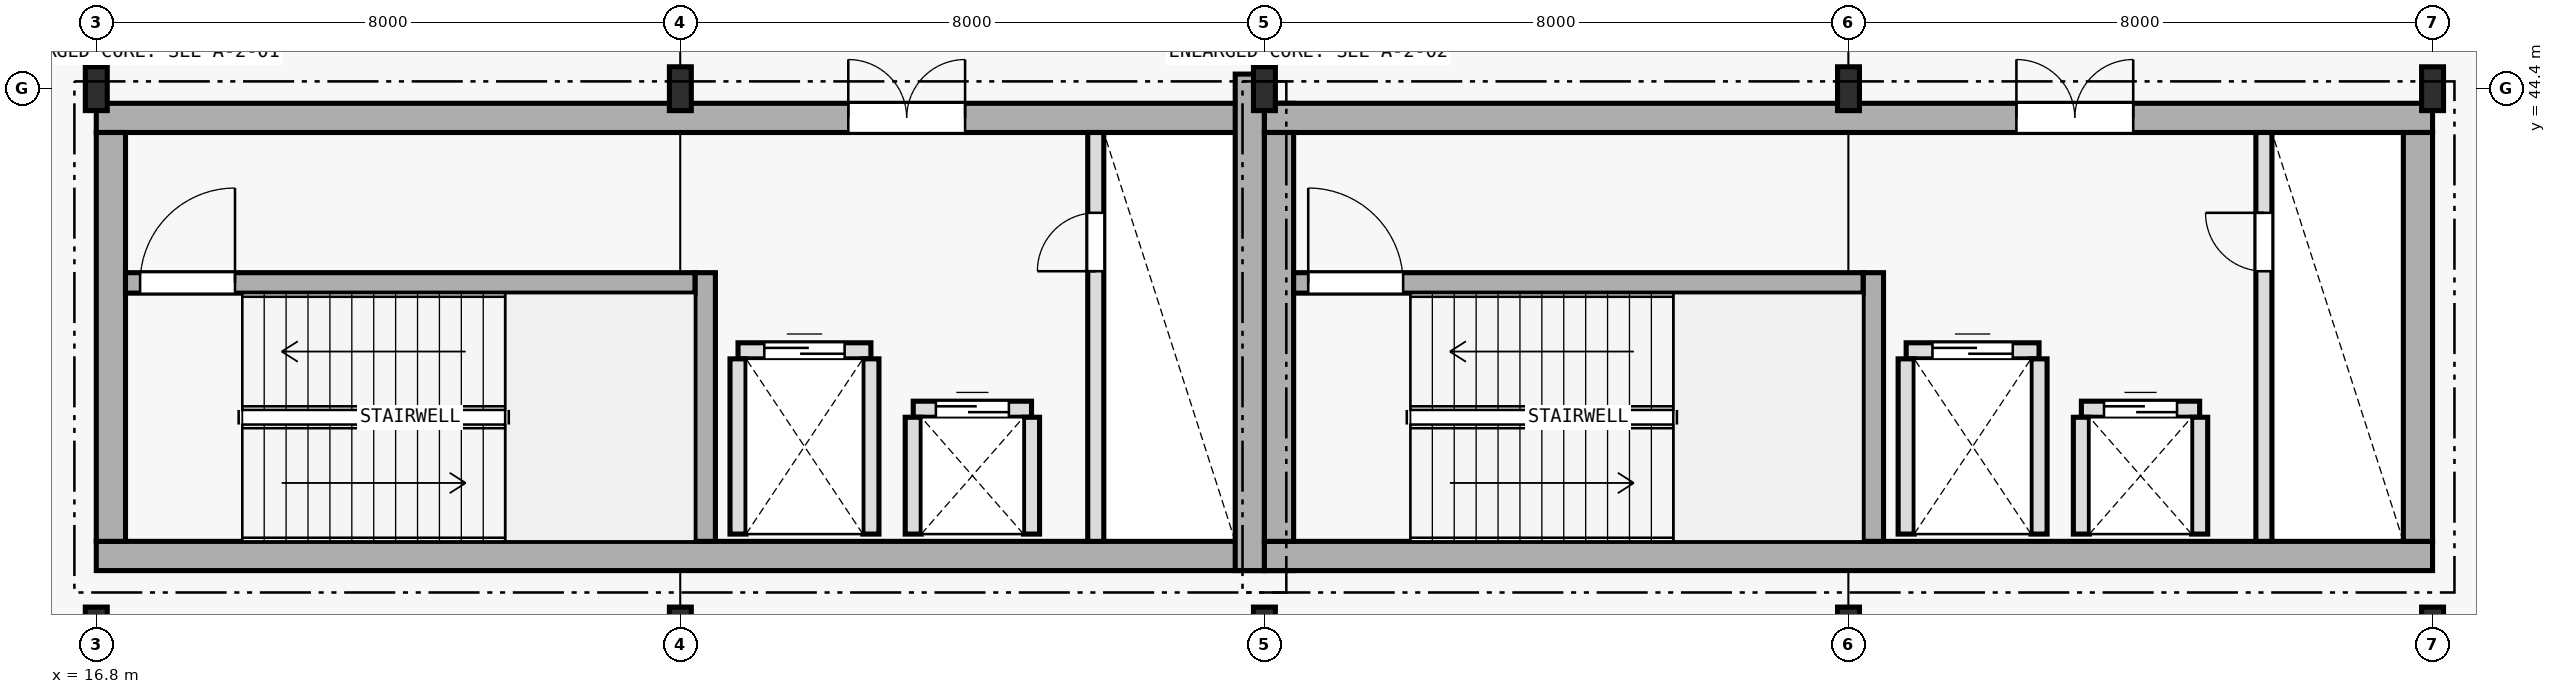
"""IFC4 building model, lengths in metres.
Left out: names, types, materials, properties, quantities, classifications, styles, units other than length and angle.
Written with IfcOpenShell. Run it as: python <this file> out.ifc"""

import sys

from ifc_helpers import new_model, si_unit, direction, frame, frame_2d, origin, origin_2d, place, context, subcontext, project, spatial, rectangle, i_section, extrude, element, fill, save


model = new_model("IFC4")
c1 = context("Model", 3, precision=1e-05, world=origin(), true_north=direction((0.0, 1.0)))
c2 = subcontext(c1, "Body", "Model", "MODEL_VIEW")
j1 = project(units=[si_unit("LENGTHUNIT", "METRE"), si_unit("PLANEANGLEUNIT", "RADIAN")], contexts=[c1])
p1 = place(None, origin())
s1 = spatial("IfcSite", under=j1, at=p1, CompositionType="ELEMENT")
p2 = place(p1, origin())
s2 = spatial("IfcBuilding", under=s1, at=p2, CompositionType="ELEMENT")
p3 = place(p2, frame((0.0, 0.0, 5.4)))
s3 = spatial("IfcBuildingStorey", under=s2, at=p3, CompositionType="ELEMENT", Elevation=5.4)
p4 = place(p3, frame((16.8, 38.0, 0.0), z_axis=(0.0, 0.0, 1.0), x_axis=(1.0, 0.0, 0.0)))
e1 = element("IfcWall", 1, at=p4, inside=s3, PredefinedType="SHEAR", context=c2, shape_type="SweptSolid", body=[
    extrude(rectangle(XDim=16.4, YDim=0.4, at=frame_2d((8.2, 0.0))), origin(), (0.0, 0.0, 1.0), 4.495),
])
p5 = place(p3, frame((16.8, 44.0, 0.0), z_axis=(0.0, 0.0, 1.0), x_axis=(1.0, 0.0, 0.0)))
e2 = element("IfcWall", 2, at=p5, inside=s3, PredefinedType="SHEAR", context=c2, shape_type="SweptSolid", body=[
    extrude(rectangle(XDim=16.4, YDim=0.4, at=frame_2d((8.2, 0.0))), origin(), (0.0, 0.0, 1.0), 4.495),
])
p6 = place(p5, frame((10.3, 0.0, 0.0)))
e3 = element("IfcOpeningElement", 3, at=p6, cuts=e2, PredefinedType="OPENING", context=c2, shape_type="SweptSolid", body=[
    extrude(rectangle(XDim=1.6, YDim=2.2, at=frame_2d((0.8, 1.1))), frame((0.0, 0.21, 0.0), z_axis=(0.0, -1.0, 0.0), x_axis=(1.0, 0.0, 0.0)), (0.0, 0.0, 1.0), 0.42),
])
p7 = place(p3, frame((17.0, 38.2, 0.0), z_axis=(0.0, 0.0, 1.0), x_axis=(0.0, 1.0, 0.0)))
e4 = element("IfcWall", 4, at=p7, inside=s3, PredefinedType="SHEAR", context=c2, shape_type="SweptSolid", body=[
    extrude(rectangle(XDim=5.6, YDim=0.4, at=frame_2d((2.8, 0.0))), origin(), (0.0, 0.0, 1.0), 4.495),
])
p8 = place(p3, frame((32.6, 37.8, 0.0), z_axis=(0.0, 0.0, 1.0), x_axis=(0.0, 1.0, 0.0)))
e5 = element("IfcWall", 5, at=p8, inside=s3, PredefinedType="SHEAR", context=c2, shape_type="SweptSolid", body=[
    extrude(rectangle(XDim=6.8, YDim=0.4, at=frame_2d((3.4, 0.0))), origin(), (0.0, 0.0, 1.0), 4.495),
])
p9 = place(p3, frame((25.14, 38.2, 0.0), z_axis=(0.0, 0.0, 1.0), x_axis=(0.0, 1.0, 0.0)))
e6 = element("IfcWall", 6, at=p9, inside=s3, PredefinedType="SHEAR", context=c2, shape_type="SweptSolid", body=[
    extrude(rectangle(XDim=3.68, YDim=0.28, at=frame_2d((1.84, 0.0))), origin(), (0.0, 0.0, 1.0), 4.495),
])
p10 = place(p3, frame((17.2, 41.74, 0.0), z_axis=(0.0, 0.0, 1.0), x_axis=(1.0, 0.0, 0.0)))
e7 = element("IfcWall", 7, at=p10, inside=s3, PredefinedType="SHEAR", context=c2, shape_type="SweptSolid", body=[
    extrude(rectangle(XDim=7.8, YDim=0.28, at=frame_2d((3.9, 0.0))), origin(), (0.0, 0.0, 1.0), 4.495),
])
p11 = place(p10, frame((0.2, 0.0, 0.0)))
e8 = element("IfcOpeningElement", 8, at=p11, cuts=e7, PredefinedType="OPENING", context=c2, shape_type="SweptSolid", body=[
    extrude(rectangle(XDim=1.3, YDim=2.2, at=frame_2d((0.65, 1.1))), frame((0.0, 0.15, 0.0), z_axis=(0.0, -1.0, 0.0), x_axis=(1.0, 0.0, 0.0)), (0.0, 0.0, 1.0), 0.3),
])
p12 = place(p3, frame((32.8, 38.0, 0.0), z_axis=(0.0, 0.0, 1.0), x_axis=(1.0, 0.0, 0.0)))
e9 = element("IfcWall", 9, at=p12, inside=s3, PredefinedType="SHEAR", context=c2, shape_type="SweptSolid", body=[
    extrude(rectangle(XDim=16.0, YDim=0.4, at=frame_2d((8.0, 0.0))), origin(), (0.0, 0.0, 1.0), 4.495),
])
p13 = place(p3, frame((32.8, 44.0, 0.0), z_axis=(0.0, 0.0, 1.0), x_axis=(1.0, 0.0, 0.0)))
e10 = element("IfcWall", 10, at=p13, inside=s3, PredefinedType="SHEAR", context=c2, shape_type="SweptSolid", body=[
    extrude(rectangle(XDim=16.0, YDim=0.4, at=frame_2d((8.0, 0.0))), origin(), (0.0, 0.0, 1.0), 4.495),
])
p14 = place(p13, frame((10.3, 0.0, 0.0)))
e11 = element("IfcOpeningElement", 11, at=p14, cuts=e10, PredefinedType="OPENING", context=c2, shape_type="SweptSolid", body=[
    extrude(rectangle(XDim=1.6, YDim=2.2, at=frame_2d((0.8, 1.1))), frame((0.0, 0.21, 0.0), z_axis=(0.0, -1.0, 0.0), x_axis=(1.0, 0.0, 0.0)), (0.0, 0.0, 1.0), 0.42),
])
for number, where, z_axis, x_axis in (
    (12, (33.0, 38.2, 0.0), (0.0, 0.0, 1.0), (0.0, 1.0, 0.0)),
    (13, (48.6, 38.2, 0.0), (0.0, 0.0, 1.0), (0.0, 1.0, 0.0)),
):
    element("IfcWall", number, at=place(p3, frame(where, z_axis=z_axis, x_axis=x_axis)), inside=s3, PredefinedType="SHEAR", context=c2, shape_type="SweptSolid", body=[
        extrude(rectangle(XDim=5.6, YDim=0.4, at=frame_2d((2.8, 0.0))), origin(), (0.0, 0.0, 1.0), 4.495),
    ])
p15 = place(p3, frame((41.14, 38.2, 0.0), z_axis=(0.0, 0.0, 1.0), x_axis=(0.0, 1.0, 0.0)))
e14 = element("IfcWall", 14, at=p15, inside=s3, PredefinedType="SHEAR", context=c2, shape_type="SweptSolid", body=[
    extrude(rectangle(XDim=3.68, YDim=0.28, at=frame_2d((1.84, 0.0))), origin(), (0.0, 0.0, 1.0), 4.495),
])
p16 = place(p3, frame((33.2, 41.74, 0.0), z_axis=(0.0, 0.0, 1.0), x_axis=(1.0, 0.0, 0.0)))
e15 = element("IfcWall", 15, at=p16, inside=s3, PredefinedType="SHEAR", context=c2, shape_type="SweptSolid", body=[
    extrude(rectangle(XDim=7.8, YDim=0.28, at=frame_2d((3.9, 0.0))), origin(), (0.0, 0.0, 1.0), 4.495),
])
p17 = place(p16, frame((0.2, 0.0, 0.0)))
e16 = element("IfcOpeningElement", 16, at=p17, cuts=e15, PredefinedType="OPENING", context=c2, shape_type="SweptSolid", body=[
    extrude(rectangle(XDim=1.3, YDim=2.2, at=frame_2d((0.65, 1.1))), frame((0.0, 0.15, 0.0), z_axis=(0.0, -1.0, 0.0), x_axis=(1.0, 0.0, 0.0)), (0.0, 0.0, 1.0), 0.3),
])
for number, where, z_axis, x_axis in (
    (17, (16.8, 37.0, 0.0), (0.0, 0.0, 1.0), (1.0, 0.0, 0.0)),
    (18, (16.8, 44.4, 0.0), (0.0, 0.0, 1.0), (1.0, 0.0, 0.0)),
    (19, (24.8, 37.0, 0.0), (0.0, 0.0, 1.0), (1.0, 0.0, 0.0)),
    (20, (24.8, 44.4, 0.0), (0.0, 0.0, 1.0), (1.0, 0.0, 0.0)),
    (21, (32.8, 37.0, 0.0), (0.0, 0.0, 1.0), (1.0, 0.0, 0.0)),
    (22, (32.8, 44.4, 0.0), (0.0, 0.0, 1.0), (1.0, 0.0, 0.0)),
    (23, (40.8, 37.0, 0.0), (0.0, 0.0, 1.0), (1.0, 0.0, 0.0)),
    (24, (40.8, 44.4, 0.0), (0.0, 0.0, 1.0), (1.0, 0.0, 0.0)),
    (25, (48.8, 37.0, 0.0), (0.0, 0.0, 1.0), (1.0, 0.0, 0.0)),
    (26, (48.8, 44.4, 0.0), (0.0, 0.0, 1.0), (1.0, 0.0, 0.0)),
):
    element("IfcColumn", number, at=place(p3, frame(where, z_axis=z_axis, x_axis=x_axis)), inside=s3, PredefinedType="COLUMN", context=c2, shape_type="SweptSolid", body=[
        extrude(i_section(OverallWidth=0.3, OverallDepth=0.6, WebThickness=0.015, FlangeThickness=0.03, FilletRadius=0.027, at=origin_2d()), origin(), (0.0, 0.0, 1.0), 4.5),
    ])
p18 = place(p3, frame((25.59, 40.81, 0.0), z_axis=(0.0, 0.0, 1.0), x_axis=(1.0, 0.0, 0.0)))
e27 = element("IfcWall", 27, at=p18, inside=s3, PredefinedType="PLUMBINGWALL", context=c2, shape_type="SweptSolid", body=[
    extrude(rectangle(XDim=1.82, YDim=0.22, at=frame_2d((0.91, 0.0))), origin(), (0.0, 0.0, 1.0), 4.2),
])
p19 = place(p18, frame((0.36, 0.0, 0.0)))
e28 = element("IfcOpeningElement", 28, at=p19, cuts=e27, PredefinedType="OPENING", context=c2, shape_type="SweptSolid", body=[
    extrude(rectangle(XDim=1.1, YDim=2.2, at=frame_2d((0.55, 1.1))), frame((0.0, 0.12, 0.0), z_axis=(0.0, -1.0, 0.0), x_axis=(1.0, 0.0, 0.0)), (0.0, 0.0, 1.0), 0.24),
])
for number, where, z_axis, x_axis in (
    (29, (25.59, 38.3, 0.0), (0.0, 0.0, 1.0), (0.0, 1.0, 0.0)),
    (30, (27.41, 38.3, 0.0), (0.0, 0.0, 1.0), (0.0, 1.0, 0.0)),
):
    element("IfcWall", number, at=place(p3, frame(where, z_axis=z_axis, x_axis=x_axis)), inside=s3, PredefinedType="PLUMBINGWALL", context=c2, shape_type="SweptSolid", body=[
        extrude(rectangle(XDim=2.4, YDim=0.22, at=frame_2d((1.2, 0.0))), origin(), (0.0, 0.0, 1.0), 4.2),
    ])
p20 = place(p3, frame((27.99, 40.01, 0.0), z_axis=(0.0, 0.0, 1.0), x_axis=(1.0, 0.0, 0.0)))
e31 = element("IfcWall", 31, at=p20, inside=s3, PredefinedType="PLUMBINGWALL", context=c2, shape_type="SweptSolid", body=[
    extrude(rectangle(XDim=1.62, YDim=0.22, at=frame_2d((0.81, 0.0))), origin(), (0.0, 0.0, 1.0), 4.2),
])
p21 = place(p20, frame((0.31, 0.0, 0.0)))
e32 = element("IfcOpeningElement", 32, at=p21, cuts=e31, PredefinedType="OPENING", context=c2, shape_type="SweptSolid", body=[
    extrude(rectangle(XDim=1.0, YDim=2.2, at=frame_2d((0.5, 1.1))), frame((0.0, 0.12, 0.0), z_axis=(0.0, -1.0, 0.0), x_axis=(1.0, 0.0, 0.0)), (0.0, 0.0, 1.0), 0.24),
])
for number, where, z_axis, x_axis in (
    (33, (27.99, 38.3, 0.0), (0.0, 0.0, 1.0), (0.0, 1.0, 0.0)),
    (34, (29.61, 38.3, 0.0), (0.0, 0.0, 1.0), (0.0, 1.0, 0.0)),
):
    element("IfcWall", number, at=place(p3, frame(where, z_axis=z_axis, x_axis=x_axis)), inside=s3, PredefinedType="PLUMBINGWALL", context=c2, shape_type="SweptSolid", body=[
        extrude(rectangle(XDim=1.6, YDim=0.22, at=frame_2d((0.8, 0.0))), origin(), (0.0, 0.0, 1.0), 4.2),
    ])
p22 = place(p3, frame((30.49, 38.2, 0.0), z_axis=(0.0, 0.0, 1.0), x_axis=(0.0, 1.0, 0.0)))
e35 = element("IfcWall", 35, at=p22, inside=s3, PredefinedType="PLUMBINGWALL", context=c2, shape_type="SweptSolid", body=[
    extrude(rectangle(XDim=5.6, YDim=0.22, at=frame_2d((2.8, 0.0))), origin(), (0.0, 0.0, 1.0), 4.2),
])
p23 = place(p22, frame((3.7, 0.0, 0.0)))
e36 = element("IfcOpeningElement", 36, at=p23, cuts=e35, PredefinedType="OPENING", context=c2, shape_type="SweptSolid", body=[
    extrude(rectangle(XDim=0.8, YDim=2.1, at=frame_2d((0.4, 1.05))), frame((0.0, 0.12, 0.0), z_axis=(0.0, -1.0, 0.0), x_axis=(1.0, 0.0, 0.0)), (0.0, 0.0, 1.0), 0.24),
])
p24 = place(p3, frame((41.59, 40.81, 0.0), z_axis=(0.0, 0.0, 1.0), x_axis=(1.0, 0.0, 0.0)))
e37 = element("IfcWall", 37, at=p24, inside=s3, PredefinedType="PLUMBINGWALL", context=c2, shape_type="SweptSolid", body=[
    extrude(rectangle(XDim=1.82, YDim=0.22, at=frame_2d((0.91, 0.0))), origin(), (0.0, 0.0, 1.0), 4.2),
])
p25 = place(p24, frame((0.36, 0.0, 0.0)))
e38 = element("IfcOpeningElement", 38, at=p25, cuts=e37, PredefinedType="OPENING", context=c2, shape_type="SweptSolid", body=[
    extrude(rectangle(XDim=1.1, YDim=2.2, at=frame_2d((0.55, 1.1))), frame((0.0, 0.12, 0.0), z_axis=(0.0, -1.0, 0.0), x_axis=(1.0, 0.0, 0.0)), (0.0, 0.0, 1.0), 0.24),
])
for number, where, z_axis, x_axis in (
    (39, (41.59, 38.3, 0.0), (0.0, 0.0, 1.0), (0.0, 1.0, 0.0)),
    (40, (43.41, 38.3, 0.0), (0.0, 0.0, 1.0), (0.0, 1.0, 0.0)),
):
    element("IfcWall", number, at=place(p3, frame(where, z_axis=z_axis, x_axis=x_axis)), inside=s3, PredefinedType="PLUMBINGWALL", context=c2, shape_type="SweptSolid", body=[
        extrude(rectangle(XDim=2.4, YDim=0.22, at=frame_2d((1.2, 0.0))), origin(), (0.0, 0.0, 1.0), 4.2),
    ])
p26 = place(p3, frame((43.99, 40.01, 0.0), z_axis=(0.0, 0.0, 1.0), x_axis=(1.0, 0.0, 0.0)))
e41 = element("IfcWall", 41, at=p26, inside=s3, PredefinedType="PLUMBINGWALL", context=c2, shape_type="SweptSolid", body=[
    extrude(rectangle(XDim=1.62, YDim=0.22, at=frame_2d((0.81, 0.0))), origin(), (0.0, 0.0, 1.0), 4.2),
])
p27 = place(p26, frame((0.31, 0.0, 0.0)))
e42 = element("IfcOpeningElement", 42, at=p27, cuts=e41, PredefinedType="OPENING", context=c2, shape_type="SweptSolid", body=[
    extrude(rectangle(XDim=1.0, YDim=2.2, at=frame_2d((0.5, 1.1))), frame((0.0, 0.12, 0.0), z_axis=(0.0, -1.0, 0.0), x_axis=(1.0, 0.0, 0.0)), (0.0, 0.0, 1.0), 0.24),
])
for number, where, z_axis, x_axis in (
    (43, (43.99, 38.3, 0.0), (0.0, 0.0, 1.0), (0.0, 1.0, 0.0)),
    (44, (45.61, 38.3, 0.0), (0.0, 0.0, 1.0), (0.0, 1.0, 0.0)),
):
    element("IfcWall", number, at=place(p3, frame(where, z_axis=z_axis, x_axis=x_axis)), inside=s3, PredefinedType="PLUMBINGWALL", context=c2, shape_type="SweptSolid", body=[
        extrude(rectangle(XDim=1.6, YDim=0.22, at=frame_2d((0.8, 0.0))), origin(), (0.0, 0.0, 1.0), 4.2),
    ])
p28 = place(p3, frame((46.49, 38.2, 0.0), z_axis=(0.0, 0.0, 1.0), x_axis=(0.0, 1.0, 0.0)))
e45 = element("IfcWall", 45, at=p28, inside=s3, PredefinedType="PLUMBINGWALL", context=c2, shape_type="SweptSolid", body=[
    extrude(rectangle(XDim=5.6, YDim=0.22, at=frame_2d((2.8, 0.0))), origin(), (0.0, 0.0, 1.0), 4.2),
])
p29 = place(p28, frame((3.7, 0.0, 0.0)))
e46 = element("IfcOpeningElement", 46, at=p29, cuts=e45, PredefinedType="OPENING", context=c2, shape_type="SweptSolid", body=[
    extrude(rectangle(XDim=0.8, YDim=2.1, at=frame_2d((0.4, 1.05))), frame((0.0, 0.12, 0.0), z_axis=(0.0, -1.0, 0.0), x_axis=(1.0, 0.0, 0.0)), (0.0, 0.0, 1.0), 0.24),
])
p30 = place(p11, origin())
e47 = element("IfcDoor", 47, at=p30, inside=s3, OperationType="SINGLE_SWING_RIGHT", PredefinedType="DOOR", context=c2, shape_type="SweptSolid", body=[
    extrude(rectangle(XDim=1.3, YDim=2.2, at=frame_2d((0.65, 1.1))), frame((0.0, 0.025, 0.0), z_axis=(0.0, -1.0, 0.0), x_axis=(1.0, 0.0, 0.0)), (0.0, 0.0, 1.0), 0.05),
])
fill(e8, e47)
p31 = place(p19, origin())
e48 = element("IfcDoor", 48, at=p31, inside=s3, OperationType="DOUBLE_DOOR_SLIDING", PredefinedType="DOOR", context=c2, shape_type="SweptSolid", body=[
    extrude(rectangle(XDim=1.1, YDim=2.2, at=frame_2d((0.55, 1.1))), frame((0.0, 0.025, 0.0), z_axis=(0.0, -1.0, 0.0), x_axis=(1.0, 0.0, 0.0)), (0.0, 0.0, 1.0), 0.05),
])
fill(e28, e48)
p32 = place(p21, origin())
e49 = element("IfcDoor", 49, at=p32, inside=s3, OperationType="DOUBLE_DOOR_SLIDING", PredefinedType="DOOR", context=c2, shape_type="SweptSolid", body=[
    extrude(rectangle(XDim=1.0, YDim=2.2, at=frame_2d((0.5, 1.1))), frame((0.0, 0.025, 0.0), z_axis=(0.0, -1.0, 0.0), x_axis=(1.0, 0.0, 0.0)), (0.0, 0.0, 1.0), 0.05),
])
fill(e32, e49)
p33 = place(p23, origin())
e50 = element("IfcDoor", 50, at=p33, inside=s3, OperationType="SINGLE_SWING_LEFT", PredefinedType="DOOR", context=c2, shape_type="SweptSolid", body=[
    extrude(rectangle(XDim=0.8, YDim=2.1, at=frame_2d((0.4, 1.05))), frame((0.0, 0.025, 0.0), z_axis=(0.0, -1.0, 0.0), x_axis=(1.0, 0.0, 0.0)), (0.0, 0.0, 1.0), 0.05),
])
fill(e36, e50)
p34 = place(p6, origin())
e51 = element("IfcDoor", 51, at=p34, inside=s3, OperationType="DOUBLE_DOOR_SINGLE_SWING", PredefinedType="DOOR", context=c2, shape_type="SweptSolid", body=[
    extrude(rectangle(XDim=1.6, YDim=2.2, at=frame_2d((0.8, 1.1))), frame((0.0, 0.025, 0.0), z_axis=(0.0, -1.0, 0.0), x_axis=(1.0, 0.0, 0.0)), (0.0, 0.0, 1.0), 0.05),
])
fill(e3, e51)
p35 = place(p17, origin())
e52 = element("IfcDoor", 52, at=p35, inside=s3, OperationType="SINGLE_SWING_LEFT", PredefinedType="DOOR", context=c2, shape_type="SweptSolid", body=[
    extrude(rectangle(XDim=1.3, YDim=2.2, at=frame_2d((0.65, 1.1))), frame((0.0, 0.025, 0.0), z_axis=(0.0, -1.0, 0.0), x_axis=(1.0, 0.0, 0.0)), (0.0, 0.0, 1.0), 0.05),
])
fill(e16, e52)
p36 = place(p25, origin())
e53 = element("IfcDoor", 53, at=p36, inside=s3, OperationType="DOUBLE_DOOR_SLIDING", PredefinedType="DOOR", context=c2, shape_type="SweptSolid", body=[
    extrude(rectangle(XDim=1.1, YDim=2.2, at=frame_2d((0.55, 1.1))), frame((0.0, 0.025, 0.0), z_axis=(0.0, -1.0, 0.0), x_axis=(1.0, 0.0, 0.0)), (0.0, 0.0, 1.0), 0.05),
])
fill(e38, e53)
p37 = place(p27, origin())
e54 = element("IfcDoor", 54, at=p37, inside=s3, OperationType="DOUBLE_DOOR_SLIDING", PredefinedType="DOOR", context=c2, shape_type="SweptSolid", body=[
    extrude(rectangle(XDim=1.0, YDim=2.2, at=frame_2d((0.5, 1.1))), frame((0.0, 0.025, 0.0), z_axis=(0.0, -1.0, 0.0), x_axis=(1.0, 0.0, 0.0)), (0.0, 0.0, 1.0), 0.05),
])
fill(e42, e54)
p38 = place(p29, origin())
e55 = element("IfcDoor", 55, at=p38, inside=s3, OperationType="SINGLE_SWING_RIGHT", PredefinedType="DOOR", context=c2, shape_type="SweptSolid", body=[
    extrude(rectangle(XDim=0.8, YDim=2.1, at=frame_2d((0.4, 1.05))), frame((0.0, 0.025, 0.0), z_axis=(0.0, -1.0, 0.0), x_axis=(1.0, 0.0, 0.0)), (0.0, 0.0, 1.0), 0.05),
])
fill(e46, e55)
p39 = place(p14, origin())
e56 = element("IfcDoor", 56, at=p39, inside=s3, OperationType="DOUBLE_DOOR_SINGLE_SWING", PredefinedType="DOOR", context=c2, shape_type="SweptSolid", body=[
    extrude(rectangle(XDim=1.6, YDim=2.2, at=frame_2d((0.8, 1.1))), frame((0.0, 0.025, 0.0), z_axis=(0.0, -1.0, 0.0), x_axis=(1.0, 0.0, 0.0)), (0.0, 0.0, 1.0), 0.05),
])
fill(e11, e56)
save(model, sys.argv[1])
